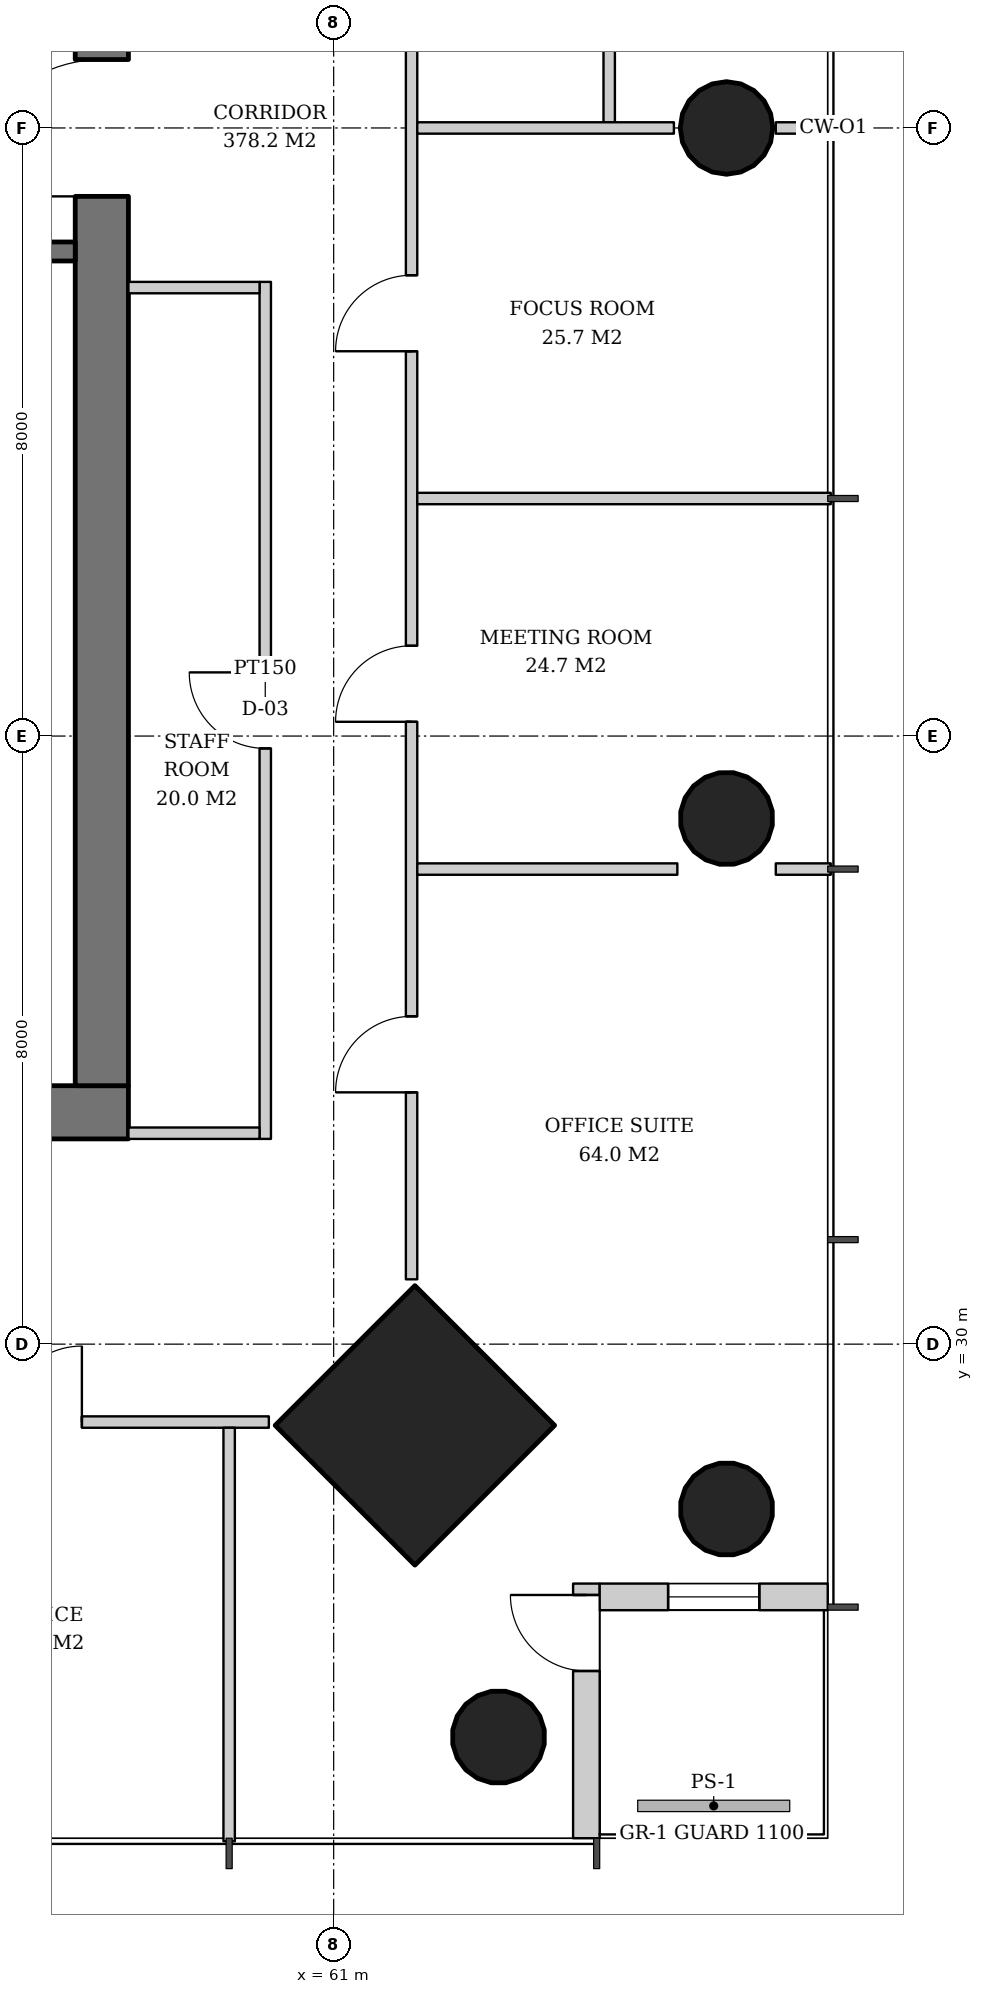
"""IFC4 building model, lengths in metres.
Left out: names, types, materials, properties, quantities, classifications, styles, units other than length and angle.
Written with IfcOpenShell. Run it as: python <this file> out.ifc"""

import sys

from ifc_helpers import new_model, si_unit, direction, frame, frame_2d, origin, origin_2d, place, context, subcontext, project, spatial, rectangle, hollow_circle, extrude, element, fill, save


model = new_model("IFC4")
c1 = context("Model", 3, precision=1e-05, world=origin(), true_north=direction((0.0, 1.0)))
c2 = subcontext(c1, "Body", "Model", "MODEL_VIEW")
j1 = project(units=[si_unit("LENGTHUNIT", "METRE"), si_unit("PLANEANGLEUNIT", "RADIAN")], contexts=[c1])
p1 = place(None, origin())
s1 = spatial("IfcSite", under=j1, at=p1, CompositionType="ELEMENT")
p2 = place(p1, origin())
s2 = spatial("IfcBuilding", under=s1, at=p2, CompositionType="ELEMENT")
p3 = place(p2, frame((0.0, 0.0, 108.4)))
s3 = spatial("IfcBuildingStorey", under=s2, at=p3, CompositionType="ELEMENT", Elevation=108.4)
p4 = place(p3, frame((66.207, 27.793, 0.0), z_axis=(-0.031898107953, 0.031898107953, 0.998981992539), x_axis=(-0.707106781187, -0.707106781187, 0.0)))
e1 = element("IfcColumn", 1, at=p4, inside=s3, PredefinedType="COLUMN", context=c2, shape_type="SweptSolid", body=[
    extrude(hollow_circle(Radius=0.61, WallThickness=0.04, at=origin_2d()), origin(), (0.0, 0.0, 1.0), 3.804),
])
p5 = place(p3, frame((66.207, 36.896, 0.0), z_axis=(-0.031910302246, 0.015923048203, 0.999363892257), x_axis=(-0.446493300058, -0.894786976326, 0.0)))
e2 = element("IfcColumn", 2, at=p5, inside=s3, PredefinedType="COLUMN", context=c2, shape_type="SweptSolid", body=[
    extrude(hollow_circle(Radius=0.61, WallThickness=0.04, at=origin_2d()), origin(), (0.0, 0.0, 1.0), 3.802),
])
p6 = place(p3, frame((66.207, 46.0, 0.0), z_axis=(-0.031914348339, 0.0, 0.999490607445), x_axis=(0.0, -1.0, 0.0)))
e3 = element("IfcColumn", 3, at=p6, inside=s3, PredefinedType="COLUMN", context=c2, shape_type="SweptSolid", body=[
    extrude(hollow_circle(Radius=0.61, WallThickness=0.04, at=origin_2d()), origin(), (0.0, 0.0, 1.0), 3.802),
])
p7 = place(p3, frame((62.107, 28.893, 0.0), z_axis=(-0.031962158256, 0.031962158256, 0.998977898093), x_axis=(-0.707106781187, -0.707106781187, 0.0)))
e4 = element("IfcColumn", 4, at=p7, inside=s3, PredefinedType="COLUMN", context=c2, shape_type="SweptSolid", body=[
    extrude(rectangle(XDim=2.6, YDim=2.6, at=origin_2d()), origin(), (0.0, 0.0, 1.0), 3.804),
])
p8 = place(p3, frame((63.207, 24.793, 0.0), z_axis=(-0.031898107953, 0.031898107953, 0.998981992539), x_axis=(-0.707106781187, -0.707106781187, 0.0)))
e5 = element("IfcColumn", 5, at=p8, inside=s3, PredefinedType="COLUMN", context=c2, shape_type="SweptSolid", body=[
    extrude(hollow_circle(Radius=0.61, WallThickness=0.04, at=origin_2d()), origin(), (0.0, 0.0, 1.0), 3.804),
])
p9 = place(p3, frame((31.7, 33.05, 0.0), z_axis=(0.0, 0.0, 1.0), x_axis=(1.0, 0.0, 0.0)))
e6 = element("IfcWall", 6, at=p9, inside=s3, PredefinedType="SHEAR", context=c2, shape_type="SweptSolid", body=[
    extrude(rectangle(XDim=26.6, YDim=0.7, at=frame_2d((13.3, 0.0))), origin(), (0.0, 0.0, 1.0), 3.8),
])
p10 = place(p9, frame((7.3, 0.0, 0.0)))
e7 = element("IfcOpeningElement", 7, at=p10, cuts=e6, PredefinedType="OPENING", context=c2, shape_type="SweptSolid", body=[
    extrude(rectangle(XDim=1.0, YDim=2.1, at=frame_2d((0.5, 1.05))), frame((0.0, 0.36, 0.0), z_axis=(0.0, -1.0, 0.0), x_axis=(1.0, 0.0, 0.0)), (0.0, 0.0, 1.0), 0.72),
])
p11 = place(p9, frame((18.75, 0.0, 0.0)))
e8 = element("IfcOpeningElement", 8, at=p11, cuts=e6, PredefinedType="OPENING", context=c2, shape_type="SweptSolid", body=[
    extrude(rectangle(XDim=1.0, YDim=2.1, at=frame_2d((0.5, 1.05))), frame((0.0, 0.36, 0.0), z_axis=(0.0, -1.0, 0.0), x_axis=(1.0, 0.0, 0.0)), (0.0, 0.0, 1.0), 0.72),
])
p12 = place(p9, frame((3.2, 0.0, 0.0)))
e9 = element("IfcOpeningElement", 9, at=p12, cuts=e6, PredefinedType="OPENING", context=c2, shape_type="SweptSolid", body=[
    extrude(rectangle(XDim=1.0, YDim=2.1, at=frame_2d((0.5, 1.05))), frame((0.0, 0.36, 0.0), z_axis=(0.0, -1.0, 0.0), x_axis=(1.0, 0.0, 0.0)), (0.0, 0.0, 1.0), 0.72),
])
p13 = place(p9, frame((10.42, 0.0, 0.0)))
e10 = element("IfcOpeningElement", 10, at=p13, cuts=e6, PredefinedType="OPENING", context=c2, shape_type="SweptSolid", body=[
    extrude(rectangle(XDim=1.0, YDim=2.1, at=frame_2d((0.5, 1.05))), frame((0.0, 0.36, 0.0), z_axis=(0.0, -1.0, 0.0), x_axis=(1.0, 0.0, 0.0)), (0.0, 0.0, 1.0), 0.72),
])
p14 = place(p9, frame((14.46, 0.0, 0.0)))
e11 = element("IfcOpeningElement", 11, at=p14, cuts=e6, PredefinedType="OPENING", context=c2, shape_type="SweptSolid", body=[
    extrude(rectangle(XDim=1.0, YDim=2.1, at=frame_2d((0.5, 1.05))), frame((0.0, 0.36, 0.0), z_axis=(0.0, -1.0, 0.0), x_axis=(1.0, 0.0, 0.0)), (0.0, 0.0, 1.0), 0.72),
])
p15 = place(p9, frame((22.5, 0.0, 0.0)))
e12 = element("IfcOpeningElement", 12, at=p15, cuts=e6, PredefinedType="OPENING", context=c2, shape_type="SweptSolid", body=[
    extrude(rectangle(XDim=1.0, YDim=2.1, at=frame_2d((0.5, 1.05))), frame((0.0, 0.36, 0.0), z_axis=(0.0, -1.0, 0.0), x_axis=(1.0, 0.0, 0.0)), (0.0, 0.0, 1.0), 0.72),
])
p16 = place(p3, frame((57.95, 33.4, 0.0), z_axis=(0.0, 0.0, 1.0), x_axis=(0.0, 1.0, 0.0)))
e13 = element("IfcWall", 13, at=p16, inside=s3, PredefinedType="SHEAR", context=c2, shape_type="SweptSolid", body=[
    extrude(rectangle(XDim=25.2, YDim=0.7, at=frame_2d((12.6, 0.0))), origin(), (0.0, 0.0, 1.0), 3.8),
])
p17 = place(p16, frame((11.7, 0.0, 0.0)))
e14 = element("IfcOpeningElement", 14, at=p17, cuts=e13, PredefinedType="OPENING", context=c2, shape_type="SweptSolid", body=[
    extrude(rectangle(XDim=1.8, YDim=2.4, at=frame_2d((0.9, 1.2))), frame((0.0, 0.36, 0.0), z_axis=(0.0, -1.0, 0.0), x_axis=(1.0, 0.0, 0.0)), (0.0, 0.0, 1.0), 0.72),
])
p18 = place(p3, frame((64.325, 23.5, 0.0), z_axis=(0.0, 0.0, 1.0), x_axis=(0.0, 1.0, 0.0)))
e15 = element("IfcWall", 15, at=p18, inside=s3, PredefinedType="SOLIDWALL", context=c2, shape_type="SweptSolid", body=[
    extrude(rectangle(XDim=3.35, YDim=0.35, at=frame_2d((1.675, 0.0))), origin(), (0.0, 0.0, 1.0), 3.62),
])
p19 = place(p18, frame((2.2, 0.0, 0.0)))
e16 = element("IfcOpeningElement", 16, at=p19, cuts=e15, PredefinedType="OPENING", context=c2, shape_type="SweptSolid", body=[
    extrude(rectangle(XDim=1.0, YDim=2.4, at=frame_2d((0.5, 1.2))), frame((0.0, 0.185, 0.0), z_axis=(0.0, -1.0, 0.0), x_axis=(1.0, 0.0, 0.0)), (0.0, 0.0, 1.0), 0.37),
])
p20 = place(p3, frame((64.5, 26.675, 0.0), z_axis=(0.0, 0.0, 1.0), x_axis=(1.0, 0.0, 0.0)))
e17 = element("IfcWall", 17, at=p20, inside=s3, PredefinedType="SOLIDWALL", context=c2, shape_type="SweptSolid", body=[
    extrude(rectangle(XDim=3.0, YDim=0.35, at=frame_2d((1.5, 0.0))), origin(), (0.0, 0.0, 1.0), 3.62),
])
p21 = place(p20, frame((0.9, 0.0, 0.6)))
e18 = element("IfcOpeningElement", 18, at=p21, cuts=e17, PredefinedType="OPENING", context=c2, shape_type="SweptSolid", body=[
    extrude(rectangle(XDim=1.2, YDim=2.55, at=frame_2d((0.6, 1.275))), frame((0.0, 0.185, 0.0), z_axis=(0.0, -1.0, 0.0), x_axis=(1.0, 0.0, 0.0)), (0.0, 0.0, 1.0), 0.37),
])
p22 = place(p3, frame((54.9, 44.375, 0.0), z_axis=(0.0, 0.0, 1.0), x_axis=(1.0, 0.0, 0.0)))
e19 = element("IfcWall", 19, at=p22, inside=s3, PredefinedType="SOLIDWALL", context=c2, shape_type="SweptSolid", body=[
    extrude(rectangle(XDim=2.7, YDim=0.25, at=frame_2d((1.35, 0.0))), origin(), (0.0, 0.0, 1.0), 3.62),
])
p23 = place(p3, frame((60.1, 32.7, 0.0), z_axis=(0.0, 0.0, 1.0), x_axis=(0.0, 1.0, 0.0)))
e20 = element("IfcWall", 20, at=p23, inside=s3, PredefinedType="PARTITIONING", context=c2, shape_type="SweptSolid", body=[
    extrude(rectangle(XDim=11.275, YDim=0.15, at=frame_2d((5.638, 0.0))), origin(), (0.0, 0.0, 1.0), 2.72),
])
p24 = place(p23, frame((5.137, 0.0, 0.0)))
e21 = element("IfcOpeningElement", 21, at=p24, cuts=e20, PredefinedType="OPENING", context=c2, shape_type="SweptSolid", body=[
    extrude(rectangle(XDim=1.0, YDim=2.1, at=frame_2d((0.5, 1.05))), frame((0.0, 0.085, 0.0), z_axis=(0.0, -1.0, 0.0), x_axis=(1.0, 0.0, 0.0)), (0.0, 0.0, 1.0), 0.17),
])
for number, where, z_axis, x_axis in (
    (22, (58.3, 32.775, 0.0), (0.0, 0.0, 1.0), (1.0, 0.0, 0.0)),
    (23, (58.3, 43.9, 0.0), (0.0, 0.0, 1.0), (1.0, 0.0, 0.0)),
):
    element("IfcWall", number, at=place(p3, frame(where, z_axis=z_axis, x_axis=x_axis)), inside=s3, PredefinedType="PARTITIONING", context=c2, shape_type="SweptSolid", body=[
        extrude(rectangle(XDim=1.725, YDim=0.15, at=frame_2d((0.862, 0.0))), origin(), (0.0, 0.0, 1.0), 3.62),
    ])
p25 = place(p3, frame((64.625, 46.075, 0.0), z_axis=(0.0, 0.0, 1.0), x_axis=(0.0, 1.0, 0.0)))
e24 = element("IfcWall", 24, at=p25, inside=s3, PredefinedType="PARTITIONING", context=c2, shape_type="SweptSolid", body=[
    extrude(rectangle(XDim=4.725, YDim=0.15, at=frame_2d((2.363, 0.0))), origin(), (0.0, 0.0, 1.0), 2.858),
])
p26 = place(p3, frame((62.025, 30.853, 0.0), z_axis=(0.0, 0.0, 1.0), x_axis=(0.0, 1.0, 0.0)))
e25 = element("IfcWall", 25, at=p26, inside=s3, PredefinedType="PARTITIONING", context=c2, shape_type="SweptSolid", body=[
    extrude(rectangle(XDim=30.294, YDim=0.15, at=frame_2d((15.147, 0.0))), origin(), (0.0, 0.0, 1.0), 2.72),
])
p27 = place(p26, frame((2.46, 0.0, 0.0)))
e26 = element("IfcOpeningElement", 26, at=p27, cuts=e25, PredefinedType="OPENING", context=c2, shape_type="SweptSolid", body=[
    extrude(rectangle(XDim=1.0, YDim=2.1, at=frame_2d((0.5, 1.05))), frame((0.0, 0.085, 0.0), z_axis=(0.0, -1.0, 0.0), x_axis=(1.0, 0.0, 0.0)), (0.0, 0.0, 1.0), 0.17),
])
p28 = place(p26, frame((7.335, 0.0, 0.0)))
e27 = element("IfcOpeningElement", 27, at=p28, cuts=e25, PredefinedType="OPENING", context=c2, shape_type="SweptSolid", body=[
    extrude(rectangle(XDim=1.0, YDim=2.1, at=frame_2d((0.5, 1.05))), frame((0.0, 0.085, 0.0), z_axis=(0.0, -1.0, 0.0), x_axis=(1.0, 0.0, 0.0)), (0.0, 0.0, 1.0), 0.17),
])
p29 = place(p26, frame((12.21, 0.0, 0.0)))
e28 = element("IfcOpeningElement", 28, at=p29, cuts=e25, PredefinedType="OPENING", context=c2, shape_type="SweptSolid", body=[
    extrude(rectangle(XDim=1.0, YDim=2.1, at=frame_2d((0.5, 1.05))), frame((0.0, 0.085, 0.0), z_axis=(0.0, -1.0, 0.0), x_axis=(1.0, 0.0, 0.0)), (0.0, 0.0, 1.0), 0.17),
])
p30 = place(p26, frame((17.085, 0.0, 0.0)))
e29 = element("IfcOpeningElement", 29, at=p30, cuts=e25, PredefinedType="OPENING", context=c2, shape_type="SweptSolid", body=[
    extrude(rectangle(XDim=1.0, YDim=2.1, at=frame_2d((0.5, 1.05))), frame((0.0, 0.085, 0.0), z_axis=(0.0, -1.0, 0.0), x_axis=(1.0, 0.0, 0.0)), (0.0, 0.0, 1.0), 0.17),
])
p31 = place(p26, frame((21.96, 0.0, 0.0)))
e30 = element("IfcOpeningElement", 30, at=p31, cuts=e25, PredefinedType="OPENING", context=c2, shape_type="SweptSolid", body=[
    extrude(rectangle(XDim=1.0, YDim=2.1, at=frame_2d((0.5, 1.05))), frame((0.0, 0.085, 0.0), z_axis=(0.0, -1.0, 0.0), x_axis=(1.0, 0.0, 0.0)), (0.0, 0.0, 1.0), 0.17),
])
p32 = place(p26, frame((26.835, 0.0, 0.0)))
e31 = element("IfcOpeningElement", 31, at=p32, cuts=e25, PredefinedType="OPENING", context=c2, shape_type="SweptSolid", body=[
    extrude(rectangle(XDim=1.0, YDim=2.1, at=frame_2d((0.5, 1.05))), frame((0.0, 0.085, 0.0), z_axis=(0.0, -1.0, 0.0), x_axis=(1.0, 0.0, 0.0)), (0.0, 0.0, 1.0), 0.17),
])
p33 = place(p3, frame((62.1, 36.25, 0.0), z_axis=(0.0, 0.0, 1.0), x_axis=(1.0, 0.0, 0.0)))
e32 = element("IfcWall", 32, at=p33, inside=s3, PredefinedType="PARTITIONING", context=c2, shape_type="SweptSolid", body=[
    extrude(rectangle(XDim=3.421, YDim=0.15, at=frame_2d((1.711, 0.0))), origin(), (0.0, 0.0, 1.0), 3.62),
])
p34 = place(p3, frame((66.817, 36.25, 0.0), z_axis=(0.0, 0.0, 1.0), x_axis=(1.0, 0.0, 0.0)))
e33 = element("IfcWall", 33, at=p34, inside=s3, PredefinedType="PARTITIONING", context=c2, shape_type="SweptSolid", body=[
    extrude(rectangle(XDim=0.723, YDim=0.15, at=frame_2d((0.362, 0.0))), origin(), (0.0, 0.0, 1.0), 3.62),
])
p35 = place(p3, frame((62.1, 41.125, 0.0), z_axis=(0.0, 0.0, 1.0), x_axis=(1.0, 0.0, 0.0)))
e34 = element("IfcWall", 34, at=p35, inside=s3, PredefinedType="PARTITIONING", context=c2, shape_type="SweptSolid", body=[
    extrude(rectangle(XDim=5.44, YDim=0.15, at=frame_2d((2.72, 0.0))), origin(), (0.0, 0.0, 1.0), 2.82),
])
p36 = place(p3, frame((62.1, 46.0, 0.0), z_axis=(0.0, 0.0, 1.0), x_axis=(1.0, 0.0, 0.0)))
e35 = element("IfcWall", 35, at=p36, inside=s3, PredefinedType="PARTITIONING", context=c2, shape_type="SweptSolid", body=[
    extrude(rectangle(XDim=3.376, YDim=0.15, at=frame_2d((1.688, 0.0))), origin(), (0.0, 0.0, 1.0), 2.858),
])
p37 = place(p3, frame((66.817, 46.0, 0.0), z_axis=(0.0, 0.0, 1.0), x_axis=(1.0, 0.0, 0.0)))
e36 = element("IfcWall", 36, at=p37, inside=s3, PredefinedType="PARTITIONING", context=c2, shape_type="SweptSolid", body=[
    extrude(rectangle(XDim=0.723, YDim=0.15, at=frame_2d((0.362, 0.0))), origin(), (0.0, 0.0, 1.0), 3.62),
])
p38 = place(p3, frame((29.853, 28.975, 0.0), z_axis=(0.0, 0.0, 1.0), x_axis=(1.0, 0.0, 0.0)))
e37 = element("IfcWall", 37, at=p38, inside=s3, PredefinedType="PARTITIONING", context=c2, shape_type="SweptSolid", body=[
    extrude(rectangle(XDim=30.294, YDim=0.15, at=frame_2d((15.147, 0.0))), origin(), (0.0, 0.0, 1.0), 2.72),
])
p39 = place(p38, frame((2.46, 0.0, 0.0)))
e38 = element("IfcOpeningElement", 38, at=p39, cuts=e37, PredefinedType="OPENING", context=c2, shape_type="SweptSolid", body=[
    extrude(rectangle(XDim=1.0, YDim=2.1, at=frame_2d((0.5, 1.05))), frame((0.0, 0.085, 0.0), z_axis=(0.0, -1.0, 0.0), x_axis=(1.0, 0.0, 0.0)), (0.0, 0.0, 1.0), 0.17),
])
p40 = place(p38, frame((7.335, 0.0, 0.0)))
e39 = element("IfcOpeningElement", 39, at=p40, cuts=e37, PredefinedType="OPENING", context=c2, shape_type="SweptSolid", body=[
    extrude(rectangle(XDim=1.0, YDim=2.1, at=frame_2d((0.5, 1.05))), frame((0.0, 0.085, 0.0), z_axis=(0.0, -1.0, 0.0), x_axis=(1.0, 0.0, 0.0)), (0.0, 0.0, 1.0), 0.17),
])
p41 = place(p38, frame((12.21, 0.0, 0.0)))
e40 = element("IfcOpeningElement", 40, at=p41, cuts=e37, PredefinedType="OPENING", context=c2, shape_type="SweptSolid", body=[
    extrude(rectangle(XDim=1.0, YDim=2.1, at=frame_2d((0.5, 1.05))), frame((0.0, 0.085, 0.0), z_axis=(0.0, -1.0, 0.0), x_axis=(1.0, 0.0, 0.0)), (0.0, 0.0, 1.0), 0.17),
])
p42 = place(p38, frame((17.085, 0.0, 0.0)))
e41 = element("IfcOpeningElement", 41, at=p42, cuts=e37, PredefinedType="OPENING", context=c2, shape_type="SweptSolid", body=[
    extrude(rectangle(XDim=1.0, YDim=2.1, at=frame_2d((0.5, 1.05))), frame((0.0, 0.085, 0.0), z_axis=(0.0, -1.0, 0.0), x_axis=(1.0, 0.0, 0.0)), (0.0, 0.0, 1.0), 0.17),
])
p43 = place(p38, frame((21.96, 0.0, 0.0)))
e42 = element("IfcOpeningElement", 42, at=p43, cuts=e37, PredefinedType="OPENING", context=c2, shape_type="SweptSolid", body=[
    extrude(rectangle(XDim=1.0, YDim=2.1, at=frame_2d((0.5, 1.05))), frame((0.0, 0.085, 0.0), z_axis=(0.0, -1.0, 0.0), x_axis=(1.0, 0.0, 0.0)), (0.0, 0.0, 1.0), 0.17),
])
p44 = place(p38, frame((26.835, 0.0, 0.0)))
e43 = element("IfcOpeningElement", 43, at=p44, cuts=e37, PredefinedType="OPENING", context=c2, shape_type="SweptSolid", body=[
    extrude(rectangle(XDim=1.0, YDim=2.1, at=frame_2d((0.5, 1.05))), frame((0.0, 0.085, 0.0), z_axis=(0.0, -1.0, 0.0), x_axis=(1.0, 0.0, 0.0)), (0.0, 0.0, 1.0), 0.17),
])
p45 = place(p3, frame((59.625, 28.9, 0.0), z_axis=(0.0, 0.0, 1.0), x_axis=(0.0, -1.0, 0.0)))
e44 = element("IfcWall", 44, at=p45, inside=s3, PredefinedType="PARTITIONING", context=c2, shape_type="SweptSolid", body=[
    extrude(rectangle(XDim=5.44, YDim=0.15, at=frame_2d((2.72, 0.0))), origin(), (0.0, 0.0, 1.0), 2.82),
])
p46 = place(p19, origin())
e45 = element("IfcDoor", 45, at=p46, inside=s3, OperationType="SINGLE_SWING_RIGHT", PredefinedType="DOOR", context=c2, shape_type="SweptSolid", body=[
    extrude(rectangle(XDim=1.0, YDim=2.4, at=frame_2d((0.5, 1.2))), frame((0.0, 0.025, 0.0), z_axis=(0.0, -1.0, 0.0), x_axis=(1.0, 0.0, 0.0)), (0.0, 0.0, 1.0), 0.05),
])
fill(e16, e45)
p47 = place(p21, origin())
e46 = element("IfcWindow", 46, at=p47, inside=s3, PartitioningType="SINGLE_PANEL", PredefinedType="WINDOW", context=c2, shape_type="SweptSolid", body=[
    extrude(rectangle(XDim=1.2, YDim=2.55, at=frame_2d((0.6, 1.275))), frame((0.0, 0.03, 0.0), z_axis=(0.0, -1.0, 0.0), x_axis=(1.0, 0.0, 0.0)), (0.0, 0.0, 1.0), 0.06),
])
fill(e18, e46)
p48 = place(p17, origin())
e47 = element("IfcDoor", 47, at=p48, inside=s3, OperationType="DOUBLE_DOOR_SINGLE_SWING", PredefinedType="DOOR", context=c2, shape_type="SweptSolid", body=[
    extrude(rectangle(XDim=1.8, YDim=2.4, at=frame_2d((0.9, 1.2))), frame((0.0, 0.025, 0.0), z_axis=(0.0, -1.0, 0.0), x_axis=(1.0, 0.0, 0.0)), (0.0, 0.0, 1.0), 0.05),
])
fill(e14, e47)
p49 = place(p24, origin())
e48 = element("IfcDoor", 48, at=p49, inside=s3, OperationType="SINGLE_SWING_RIGHT", PredefinedType="DOOR", context=c2, shape_type="SweptSolid", body=[
    extrude(rectangle(XDim=1.0, YDim=2.1, at=frame_2d((0.5, 1.05))), frame((0.0, 0.025, 0.0), z_axis=(0.0, -1.0, 0.0), x_axis=(1.0, 0.0, 0.0)), (0.0, 0.0, 1.0), 0.05),
])
fill(e21, e48)
p50 = place(p27, origin())
e49 = element("IfcDoor", 49, at=p50, inside=s3, OperationType="SINGLE_SWING_LEFT", PredefinedType="DOOR", context=c2, shape_type="SweptSolid", body=[
    extrude(rectangle(XDim=1.0, YDim=2.1, at=frame_2d((0.5, 1.05))), frame((0.0, 0.025, 0.0), z_axis=(0.0, -1.0, 0.0), x_axis=(1.0, 0.0, 0.0)), (0.0, 0.0, 1.0), 0.05),
])
fill(e26, e49)
p51 = place(p28, origin())
e50 = element("IfcDoor", 50, at=p51, inside=s3, OperationType="SINGLE_SWING_LEFT", PredefinedType="DOOR", context=c2, shape_type="SweptSolid", body=[
    extrude(rectangle(XDim=1.0, YDim=2.1, at=frame_2d((0.5, 1.05))), frame((0.0, 0.025, 0.0), z_axis=(0.0, -1.0, 0.0), x_axis=(1.0, 0.0, 0.0)), (0.0, 0.0, 1.0), 0.05),
])
fill(e27, e50)
p52 = place(p29, origin())
e51 = element("IfcDoor", 51, at=p52, inside=s3, OperationType="SINGLE_SWING_LEFT", PredefinedType="DOOR", context=c2, shape_type="SweptSolid", body=[
    extrude(rectangle(XDim=1.0, YDim=2.1, at=frame_2d((0.5, 1.05))), frame((0.0, 0.025, 0.0), z_axis=(0.0, -1.0, 0.0), x_axis=(1.0, 0.0, 0.0)), (0.0, 0.0, 1.0), 0.05),
])
fill(e28, e51)
p53 = place(p44, origin())
e52 = element("IfcDoor", 52, at=p53, inside=s3, OperationType="SINGLE_SWING_RIGHT", PredefinedType="DOOR", context=c2, shape_type="SweptSolid", body=[
    extrude(rectangle(XDim=1.0, YDim=2.1, at=frame_2d((0.5, 1.05))), frame((0.0, 0.025, 0.0), z_axis=(0.0, -1.0, 0.0), x_axis=(1.0, 0.0, 0.0)), (0.0, 0.0, 1.0), 0.05),
])
fill(e43, e52)
save(model, sys.argv[1])
